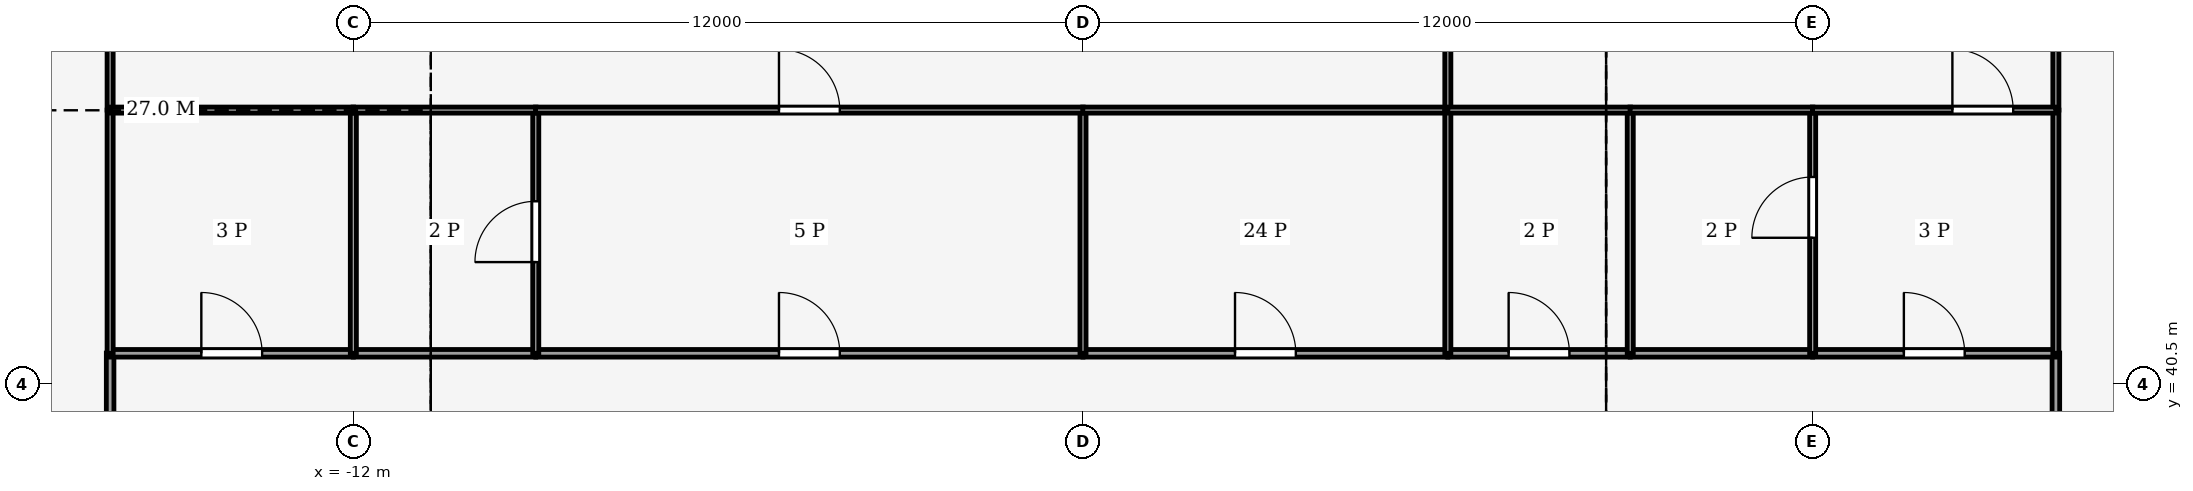
"""IFC4 building model, lengths in metres.
Left out: names, types, materials, properties, quantities, classifications, styles, units other than length and angle.
Written with IfcOpenShell. Run it as: python <this file> out.ifc"""

import sys

from ifc_helpers import new_model, si_unit, direction, frame, frame_2d, origin, place, context, subcontext, project, spatial, rectangle, extrude, element, fill, save


model = new_model("IFC4")
c1 = context("Model", 3, precision=1e-05, world=origin(), true_north=direction((0.0, 1.0)))
c2 = subcontext(c1, "Body", "Model", "MODEL_VIEW")
j1 = project(units=[si_unit("LENGTHUNIT", "METRE"), si_unit("PLANEANGLEUNIT", "RADIAN")], contexts=[c1])
p1 = place(None, origin())
s1 = spatial("IfcSite", under=j1, at=p1, CompositionType="ELEMENT")
p2 = place(p1, origin())
s2 = spatial("IfcBuilding", under=s1, at=p2, CompositionType="ELEMENT")
p3 = place(p2, frame((0.0, 0.0, 146.0)))
s3 = spatial("IfcBuildingStorey", under=s2, at=p3, CompositionType="ELEMENT", Elevation=146.0)
p4 = place(p3, frame((-16.0, 41.004, 0.0), z_axis=(0.0, 0.0, 1.0), x_axis=(0.0, -1.0, 0.0)))
e1 = element("IfcWall", 1, at=p4, inside=s3, PredefinedType="PARTITIONING", context=c2, shape_type="SweptSolid", body=[
    extrude(rectangle(XDim=8.004, YDim=0.125, at=frame_2d((4.002, 0.0))), origin(), (0.0, 0.0, 1.0), 3.14),
])
p5 = place(p4, frame((3.102, 0.0, 0.0)))
e2 = element("IfcOpeningElement", 2, at=p5, cuts=e1, PredefinedType="OPENING", context=c2, shape_type="SweptSolid", body=[
    extrude(rectangle(XDim=1.8, YDim=2.1, at=frame_2d((0.9, 1.05))), frame((0.0, 0.073, 0.0), z_axis=(0.0, -1.0, 0.0), x_axis=(1.0, 0.0, 0.0)), (0.0, 0.0, 1.0), 0.145),
])
p6 = place(p3, frame((16.0, 41.004, 0.0), z_axis=(0.0, 0.0, 1.0), x_axis=(0.0, -1.0, 0.0)))
e3 = element("IfcWall", 3, at=p6, inside=s3, PredefinedType="PARTITIONING", context=c2, shape_type="SweptSolid", body=[
    extrude(rectangle(XDim=11.004, YDim=0.125, at=frame_2d((5.502, 0.0))), origin(), (0.0, 0.0, 1.0), 3.14),
])
p7 = place(p6, frame((5.002, 0.0, 0.0)))
e4 = element("IfcOpeningElement", 4, at=p7, cuts=e3, PredefinedType="OPENING", context=c2, shape_type="SweptSolid", body=[
    extrude(rectangle(XDim=1.0, YDim=2.1, at=frame_2d((0.5, 1.05))), frame((0.0, 0.073, 0.0), z_axis=(0.0, -1.0, 0.0), x_axis=(1.0, 0.0, 0.0)), (0.0, 0.0, 1.0), 0.145),
])
p8 = place(p3, frame((-16.0, 41.0, 0.0), z_axis=(0.0, 0.0, 1.0), x_axis=(1.0, 0.0, 0.0)))
e5 = element("IfcWall", 5, at=p8, inside=s3, PredefinedType="PARTITIONING", context=c2, shape_type="SweptSolid", body=[
    extrude(rectangle(XDim=4.0, YDim=0.125, at=frame_2d((2.0, 0.0))), origin(), (0.0, 0.0, 1.0), 3.44),
])
p9 = place(p8, frame((1.5, 0.0, 0.0)))
e6 = element("IfcOpeningElement", 6, at=p9, cuts=e5, PredefinedType="OPENING", context=c2, shape_type="SweptSolid", body=[
    extrude(rectangle(XDim=1.0, YDim=2.1, at=frame_2d((0.5, 1.05))), frame((0.0, 0.073, 0.0), z_axis=(0.0, -1.0, 0.0), x_axis=(1.0, 0.0, 0.0)), (0.0, 0.0, 1.0), 0.145),
])
p10 = place(p3, frame((-9.0, 41.0, 0.0), z_axis=(0.0, 0.0, 1.0), x_axis=(-1.0, 0.0, 0.0)))
e7 = element("IfcWall", 7, at=p10, inside=s3, PredefinedType="PARTITIONING", context=c2, shape_type="SweptSolid", body=[
    extrude(rectangle(XDim=3.0, YDim=0.125, at=frame_2d((1.5, 0.0))), origin(), (0.0, 0.0, 1.0), 3.44),
])
p11 = place(p3, frame((-9.0, 41.0, 0.0), z_axis=(0.0, 0.0, 1.0), x_axis=(1.0, 0.0, 0.0)))
e8 = element("IfcWall", 8, at=p11, inside=s3, PredefinedType="PARTITIONING", context=c2, shape_type="SweptSolid", body=[
    extrude(rectangle(XDim=9.0, YDim=0.125, at=frame_2d((4.5, 0.0))), origin(), (0.0, 0.0, 1.0), 3.44),
])
p12 = place(p11, frame((4.0, 0.0, 0.0)))
e9 = element("IfcOpeningElement", 9, at=p12, cuts=e8, PredefinedType="OPENING", context=c2, shape_type="SweptSolid", body=[
    extrude(rectangle(XDim=1.0, YDim=2.1, at=frame_2d((0.5, 1.05))), frame((0.0, 0.073, 0.0), z_axis=(0.0, -1.0, 0.0), x_axis=(1.0, 0.0, 0.0)), (0.0, 0.0, 1.0), 0.145),
])
p13 = place(p3, frame((0.0, 41.0, 0.0), z_axis=(0.0, 0.0, 1.0), x_axis=(1.0, 0.0, 0.0)))
e10 = element("IfcWall", 10, at=p13, inside=s3, PredefinedType="PARTITIONING", context=c2, shape_type="SweptSolid", body=[
    extrude(rectangle(XDim=6.0, YDim=0.125, at=frame_2d((3.0, 0.0))), origin(), (0.0, 0.0, 1.0), 3.44),
])
p14 = place(p13, frame((2.5, 0.0, 0.0)))
e11 = element("IfcOpeningElement", 11, at=p14, cuts=e10, PredefinedType="OPENING", context=c2, shape_type="SweptSolid", body=[
    extrude(rectangle(XDim=1.0, YDim=2.1, at=frame_2d((0.5, 1.05))), frame((0.0, 0.073, 0.0), z_axis=(0.0, -1.0, 0.0), x_axis=(1.0, 0.0, 0.0)), (0.0, 0.0, 1.0), 0.145),
])
p15 = place(p3, frame((6.0, 41.0, 0.0), z_axis=(0.0, 0.0, 1.0), x_axis=(1.0, 0.0, 0.0)))
e12 = element("IfcWall", 12, at=p15, inside=s3, PredefinedType="PARTITIONING", context=c2, shape_type="SweptSolid", body=[
    extrude(rectangle(XDim=3.0, YDim=0.125, at=frame_2d((1.5, 0.0))), origin(), (0.0, 0.0, 1.0), 3.44),
])
p16 = place(p15, frame((1.0, 0.0, 0.0)))
e13 = element("IfcOpeningElement", 13, at=p16, cuts=e12, PredefinedType="OPENING", context=c2, shape_type="SweptSolid", body=[
    extrude(rectangle(XDim=1.0, YDim=2.1, at=frame_2d((0.5, 1.05))), frame((0.0, 0.073, 0.0), z_axis=(0.0, -1.0, 0.0), x_axis=(1.0, 0.0, 0.0)), (0.0, 0.0, 1.0), 0.145),
])
p17 = place(p3, frame((12.0, 41.0, 0.0), z_axis=(0.0, 0.0, 1.0), x_axis=(-1.0, 0.0, 0.0)))
e14 = element("IfcWall", 14, at=p17, inside=s3, PredefinedType="PARTITIONING", context=c2, shape_type="SweptSolid", body=[
    extrude(rectangle(XDim=3.0, YDim=0.125, at=frame_2d((1.5, 0.0))), origin(), (0.0, 0.0, 1.0), 3.44),
])
p18 = place(p3, frame((12.0, 41.0, 0.0), z_axis=(0.0, 0.0, 1.0), x_axis=(1.0, 0.0, 0.0)))
e15 = element("IfcWall", 15, at=p18, inside=s3, PredefinedType="PARTITIONING", context=c2, shape_type="SweptSolid", body=[
    extrude(rectangle(XDim=4.0, YDim=0.125, at=frame_2d((2.0, 0.0))), origin(), (0.0, 0.0, 1.0), 3.44),
])
p19 = place(p18, frame((1.5, 0.0, 0.0)))
e16 = element("IfcOpeningElement", 16, at=p19, cuts=e15, PredefinedType="OPENING", context=c2, shape_type="SweptSolid", body=[
    extrude(rectangle(XDim=1.0, YDim=2.1, at=frame_2d((0.5, 1.05))), frame((0.0, 0.073, 0.0), z_axis=(0.0, -1.0, 0.0), x_axis=(1.0, 0.0, 0.0)), (0.0, 0.0, 1.0), 0.145),
])
p20 = place(p3, frame((-16.0, 41.0, 0.0), z_axis=(0.0, 0.0, 1.0), x_axis=(0.0, 1.0, 0.0)))
e17 = element("IfcWall", 17, at=p20, inside=s3, PredefinedType="PARTITIONING", context=c2, shape_type="SweptSolid", body=[
    extrude(rectangle(XDim=4.0, YDim=0.1, at=frame_2d((2.0, 0.0))), origin(), (0.0, 0.0, 1.0), 3.44),
])
p21 = place(p3, frame((-16.0, 45.0, 0.0), z_axis=(0.0, 0.0, 1.0), x_axis=(0.0, 1.0, 0.0)))
e18 = element("IfcWall", 18, at=p21, inside=s3, PredefinedType="PARTITIONING", context=c2, shape_type="SweptSolid", body=[
    extrude(rectangle(XDim=9.0, YDim=0.1, at=frame_2d((4.5, 0.0))), origin(), (0.0, 0.0, 1.0), 3.24),
])
p22 = place(p3, frame((16.0, 45.0, 0.0), z_axis=(0.0, 0.0, 1.0), x_axis=(0.0, -1.0, 0.0)))
e19 = element("IfcWall", 19, at=p22, inside=s3, PredefinedType="PARTITIONING", context=c2, shape_type="SweptSolid", body=[
    extrude(rectangle(XDim=4.0, YDim=0.1, at=frame_2d((2.0, 0.0))), origin(), (0.0, 0.0, 1.0), 3.44),
])
p23 = place(p3, frame((16.0, 57.0, 0.0), z_axis=(0.0, 0.0, 1.0), x_axis=(0.0, -1.0, 0.0)))
e20 = element("IfcWall", 20, at=p23, inside=s3, PredefinedType="PARTITIONING", context=c2, shape_type="SweptSolid", body=[
    extrude(rectangle(XDim=12.0, YDim=0.1, at=frame_2d((6.0, 0.0))), origin(), (0.0, 0.0, 1.0), 3.24),
])
p24 = place(p3, frame((-12.0, 41.0, 0.0), z_axis=(0.0, 0.0, 1.0), x_axis=(0.0, 1.0, 0.0)))
e21 = element("IfcWall", 21, at=p24, inside=s3, PredefinedType="PARTITIONING", context=c2, shape_type="SweptSolid", body=[
    extrude(rectangle(XDim=4.0, YDim=0.1, at=frame_2d((2.0, 0.0))), origin(), (0.0, 0.0, 1.0), 3.44),
])
p25 = place(p3, frame((-11.996, 45.0, 0.0), z_axis=(0.0, 0.0, 1.0), x_axis=(-1.0, 0.0, 0.0)))
e22 = element("IfcWall", 22, at=p25, inside=s3, PredefinedType="PARTITIONING", context=c2, shape_type="SweptSolid", body=[
    extrude(rectangle(XDim=4.004, YDim=0.1, at=frame_2d((2.002, 0.0))), origin(), (0.0, 0.0, 1.0), 3.87),
])
p26 = place(p3, frame((-9.0, 41.0, 0.0), z_axis=(0.0, 0.0, 1.0), x_axis=(0.0, 1.0, 0.0)))
e23 = element("IfcWall", 23, at=p26, inside=s3, PredefinedType="PARTITIONING", context=c2, shape_type="SweptSolid", body=[
    extrude(rectangle(XDim=4.0, YDim=0.1, at=frame_2d((2.0, 0.0))), origin(), (0.0, 0.0, 1.0), 3.87),
])
p27 = place(p26, frame((1.5, 0.0, 0.0)))
e24 = element("IfcOpeningElement", 24, at=p27, cuts=e23, PredefinedType="OPENING", context=c2, shape_type="SweptSolid", body=[
    extrude(rectangle(XDim=1.0, YDim=2.1, at=frame_2d((0.5, 1.05))), frame((0.0, 0.06, 0.0), z_axis=(0.0, -1.0, 0.0), x_axis=(1.0, 0.0, 0.0)), (0.0, 0.0, 1.0), 0.12),
])
p28 = place(p3, frame((-8.996, 45.0, 0.0), z_axis=(0.0, 0.0, 1.0), x_axis=(-1.0, 0.0, 0.0)))
e25 = element("IfcWall", 25, at=p28, inside=s3, PredefinedType="PARTITIONING", context=c2, shape_type="SweptSolid", body=[
    extrude(rectangle(XDim=3.008, YDim=0.1, at=frame_2d((1.504, 0.0))), origin(), (0.0, 0.0, 1.0), 3.87),
])
p29 = place(p3, frame((0.0, 41.0, 0.0), z_axis=(0.0, 0.0, 1.0), x_axis=(0.0, 1.0, 0.0)))
e26 = element("IfcWall", 26, at=p29, inside=s3, PredefinedType="PARTITIONING", context=c2, shape_type="SweptSolid", body=[
    extrude(rectangle(XDim=4.0, YDim=0.1, at=frame_2d((2.0, 0.0))), origin(), (0.0, 0.0, 1.0), 3.44),
])
p30 = place(p3, frame((-9.004, 45.0, 0.0), z_axis=(0.0, 0.0, 1.0), x_axis=(1.0, 0.0, 0.0)))
e27 = element("IfcWall", 27, at=p30, inside=s3, PredefinedType="PARTITIONING", context=c2, shape_type="SweptSolid", body=[
    extrude(rectangle(XDim=9.008, YDim=0.1, at=frame_2d((4.504, 0.0))), origin(), (0.0, 0.0, 1.0), 3.44),
])
p31 = place(p30, frame((4.004, 0.0, 0.0)))
e28 = element("IfcOpeningElement", 28, at=p31, cuts=e27, PredefinedType="OPENING", context=c2, shape_type="SweptSolid", body=[
    extrude(rectangle(XDim=1.0, YDim=2.1, at=frame_2d((0.5, 1.05))), frame((0.0, 0.06, 0.0), z_axis=(0.0, -1.0, 0.0), x_axis=(1.0, 0.0, 0.0)), (0.0, 0.0, 1.0), 0.12),
])
p32 = place(p3, frame((6.0, 45.0, 0.0), z_axis=(0.0, 0.0, 1.0), x_axis=(-1.0, 0.0, 0.0)))
e29 = element("IfcWall", 29, at=p32, inside=s3, PredefinedType="PARTITIONING", context=c2, shape_type="SweptSolid", body=[
    extrude(rectangle(XDim=6.004, YDim=0.1, at=frame_2d((3.002, 0.0))), origin(), (0.0, 0.0, 1.0), 3.44),
])
p33 = place(p3, frame((6.0, 41.0, 0.0), z_axis=(0.0, 0.0, 1.0), x_axis=(0.0, 1.0, 0.0)))
e30 = element("IfcWall", 30, at=p33, inside=s3, PredefinedType="PARTITIONING", context=c2, shape_type="SweptSolid", body=[
    extrude(rectangle(XDim=4.0, YDim=0.1, at=frame_2d((2.0, 0.0))), origin(), (0.0, 0.0, 1.0), 3.87),
])
p34 = place(p3, frame((6.0, 45.0, 0.0), z_axis=(0.0, 0.0, 1.0), x_axis=(0.0, 1.0, 0.0)))
e31 = element("IfcWall", 31, at=p34, inside=s3, PredefinedType="PARTITIONING", context=c2, shape_type="SweptSolid", body=[
    extrude(rectangle(XDim=9.004, YDim=0.1, at=frame_2d((4.502, 0.0))), origin(), (0.0, 0.0, 1.0), 3.24),
])
p35 = place(p3, frame((9.0, 41.0, 0.0), z_axis=(0.0, 0.0, 1.0), x_axis=(0.0, 1.0, 0.0)))
e32 = element("IfcWall", 32, at=p35, inside=s3, PredefinedType="PARTITIONING", context=c2, shape_type="SweptSolid", body=[
    extrude(rectangle(XDim=4.0, YDim=0.1, at=frame_2d((2.0, 0.0))), origin(), (0.0, 0.0, 1.0), 3.87),
])
p36 = place(p3, frame((9.004, 45.0, 0.0), z_axis=(0.0, 0.0, 1.0), x_axis=(-1.0, 0.0, 0.0)))
e33 = element("IfcWall", 33, at=p36, inside=s3, PredefinedType="PARTITIONING", context=c2, shape_type="SweptSolid", body=[
    extrude(rectangle(XDim=3.004, YDim=0.1, at=frame_2d((1.502, 0.0))), origin(), (0.0, 0.0, 1.0), 3.44),
])
p37 = place(p3, frame((12.0, 41.0, 0.0), z_axis=(0.0, 0.0, 1.0), x_axis=(0.0, 1.0, 0.0)))
e34 = element("IfcWall", 34, at=p37, inside=s3, PredefinedType="PARTITIONING", context=c2, shape_type="SweptSolid", body=[
    extrude(rectangle(XDim=4.0, YDim=0.1, at=frame_2d((2.0, 0.0))), origin(), (0.0, 0.0, 1.0), 3.44),
])
p38 = place(p37, frame((1.9, 0.0, 0.0)))
e35 = element("IfcOpeningElement", 35, at=p38, cuts=e34, PredefinedType="OPENING", context=c2, shape_type="SweptSolid", body=[
    extrude(rectangle(XDim=1.0, YDim=2.1, at=frame_2d((0.5, 1.05))), frame((0.0, 0.06, 0.0), z_axis=(0.0, -1.0, 0.0), x_axis=(1.0, 0.0, 0.0)), (0.0, 0.0, 1.0), 0.12),
])
p39 = place(p3, frame((12.004, 45.0, 0.0), z_axis=(0.0, 0.0, 1.0), x_axis=(-1.0, 0.0, 0.0)))
e36 = element("IfcWall", 36, at=p39, inside=s3, PredefinedType="PARTITIONING", context=c2, shape_type="SweptSolid", body=[
    extrude(rectangle(XDim=3.008, YDim=0.1, at=frame_2d((1.504, 0.0))), origin(), (0.0, 0.0, 1.0), 3.87),
])
p40 = place(p3, frame((11.996, 45.0, 0.0), z_axis=(0.0, 0.0, 1.0), x_axis=(1.0, 0.0, 0.0)))
e37 = element("IfcWall", 37, at=p40, inside=s3, PredefinedType="PARTITIONING", context=c2, shape_type="SweptSolid", body=[
    extrude(rectangle(XDim=4.004, YDim=0.1, at=frame_2d((2.002, 0.0))), origin(), (0.0, 0.0, 1.0), 3.87),
])
p41 = place(p40, frame((2.302, 0.0, 0.0)))
e38 = element("IfcOpeningElement", 38, at=p41, cuts=e37, PredefinedType="OPENING", context=c2, shape_type="SweptSolid", body=[
    extrude(rectangle(XDim=1.0, YDim=2.1, at=frame_2d((0.5, 1.05))), frame((0.0, 0.06, 0.0), z_axis=(0.0, -1.0, 0.0), x_axis=(1.0, 0.0, 0.0)), (0.0, 0.0, 1.0), 0.12),
])
p42 = place(p9, origin())
e39 = element("IfcDoor", 39, at=p42, inside=s3, OperationType="SINGLE_SWING_LEFT", PredefinedType="DOOR", context=c2, shape_type="SweptSolid", body=[
    extrude(rectangle(XDim=1.0, YDim=2.1, at=frame_2d((0.5, 1.05))), frame((0.0, 0.025, 0.0), z_axis=(0.0, -1.0, 0.0), x_axis=(1.0, 0.0, 0.0)), (0.0, 0.0, 1.0), 0.05),
])
fill(e6, e39)
p43 = place(p12, origin())
e40 = element("IfcDoor", 40, at=p43, inside=s3, OperationType="SINGLE_SWING_RIGHT", PredefinedType="DOOR", context=c2, shape_type="SweptSolid", body=[
    extrude(rectangle(XDim=1.0, YDim=2.1, at=frame_2d((0.5, 1.05))), frame((0.0, 0.025, 0.0), z_axis=(0.0, -1.0, 0.0), x_axis=(1.0, 0.0, 0.0)), (0.0, 0.0, 1.0), 0.05),
])
fill(e9, e40)
p44 = place(p14, origin())
e41 = element("IfcDoor", 41, at=p44, inside=s3, OperationType="SINGLE_SWING_LEFT", PredefinedType="DOOR", context=c2, shape_type="SweptSolid", body=[
    extrude(rectangle(XDim=1.0, YDim=2.1, at=frame_2d((0.5, 1.05))), frame((0.0, 0.025, 0.0), z_axis=(0.0, -1.0, 0.0), x_axis=(1.0, 0.0, 0.0)), (0.0, 0.0, 1.0), 0.05),
])
fill(e11, e41)
p45 = place(p16, origin())
e42 = element("IfcDoor", 42, at=p45, inside=s3, OperationType="SINGLE_SWING_RIGHT", PredefinedType="DOOR", context=c2, shape_type="SweptSolid", body=[
    extrude(rectangle(XDim=1.0, YDim=2.1, at=frame_2d((0.5, 1.05))), frame((0.0, 0.025, 0.0), z_axis=(0.0, -1.0, 0.0), x_axis=(1.0, 0.0, 0.0)), (0.0, 0.0, 1.0), 0.05),
])
fill(e13, e42)
p46 = place(p19, origin())
e43 = element("IfcDoor", 43, at=p46, inside=s3, OperationType="SINGLE_SWING_LEFT", PredefinedType="DOOR", context=c2, shape_type="SweptSolid", body=[
    extrude(rectangle(XDim=1.0, YDim=2.1, at=frame_2d((0.5, 1.05))), frame((0.0, 0.025, 0.0), z_axis=(0.0, -1.0, 0.0), x_axis=(1.0, 0.0, 0.0)), (0.0, 0.0, 1.0), 0.05),
])
fill(e16, e43)
p47 = place(p27, origin())
e44 = element("IfcDoor", 44, at=p47, inside=s3, OperationType="SINGLE_SWING_RIGHT", PredefinedType="DOOR", context=c2, shape_type="SweptSolid", body=[
    extrude(rectangle(XDim=1.0, YDim=2.1, at=frame_2d((0.5, 1.05))), frame((0.0, 0.025, 0.0), z_axis=(0.0, -1.0, 0.0), x_axis=(1.0, 0.0, 0.0)), (0.0, 0.0, 1.0), 0.05),
])
fill(e24, e44)
p48 = place(p31, origin())
e45 = element("IfcDoor", 45, at=p48, inside=s3, OperationType="SINGLE_SWING_LEFT", PredefinedType="DOOR", context=c2, shape_type="SweptSolid", body=[
    extrude(rectangle(XDim=1.0, YDim=2.1, at=frame_2d((0.5, 1.05))), frame((0.0, 0.025, 0.0), z_axis=(0.0, -1.0, 0.0), x_axis=(1.0, 0.0, 0.0)), (0.0, 0.0, 1.0), 0.05),
])
fill(e28, e45)
p49 = place(p38, origin())
e46 = element("IfcDoor", 46, at=p49, inside=s3, OperationType="SINGLE_SWING_RIGHT", PredefinedType="DOOR", context=c2, shape_type="SweptSolid", body=[
    extrude(rectangle(XDim=1.0, YDim=2.1, at=frame_2d((0.5, 1.05))), frame((0.0, 0.025, 0.0), z_axis=(0.0, -1.0, 0.0), x_axis=(1.0, 0.0, 0.0)), (0.0, 0.0, 1.0), 0.05),
])
fill(e35, e46)
p50 = place(p41, origin())
e47 = element("IfcDoor", 47, at=p50, inside=s3, OperationType="SINGLE_SWING_RIGHT", PredefinedType="DOOR", context=c2, shape_type="SweptSolid", body=[
    extrude(rectangle(XDim=1.0, YDim=2.1, at=frame_2d((0.5, 1.05))), frame((0.0, 0.025, 0.0), z_axis=(0.0, -1.0, 0.0), x_axis=(1.0, 0.0, 0.0)), (0.0, 0.0, 1.0), 0.05),
])
fill(e38, e47)
save(model, sys.argv[1])
